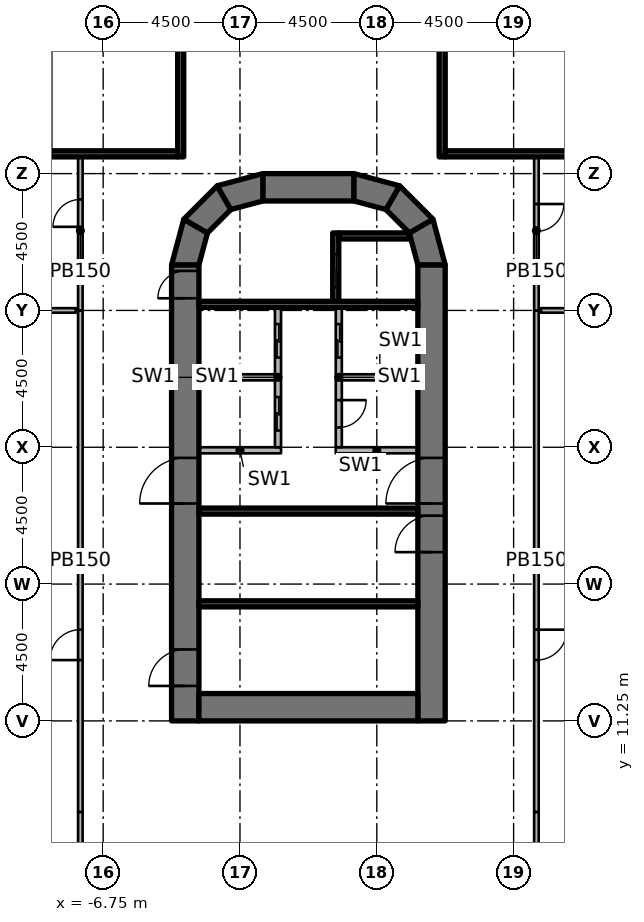
"""IFC4 building model, lengths in metres.
Left out: names, types, materials, properties, quantities, classifications, styles, units other than length and angle.
Written with IfcOpenShell. Run it as: python <this file> out.ifc"""

import sys

from ifc_helpers import new_model, si_unit, direction, frame, frame_2d, origin, origin_2d, place, context, subcontext, project, spatial, polyline, rectangle, outline, extrude, element, fill, save


model = new_model("IFC4")
c1 = context("Model", 3, precision=1e-05, world=origin(), true_north=direction((0.0, 1.0)))
c2 = subcontext(c1, "Body", "Model", "MODEL_VIEW")
j1 = project(units=[si_unit("LENGTHUNIT", "METRE"), si_unit("PLANEANGLEUNIT", "RADIAN")], contexts=[c1])
p1 = place(None, origin())
s1 = spatial("IfcSite", under=j1, at=p1, CompositionType="ELEMENT")
p2 = place(p1, origin())
s2 = spatial("IfcBuilding", under=s1, at=p2, CompositionType="ELEMENT")
p3 = place(p2, frame((0.0, 0.0, 12.0)))
s3 = spatial("IfcBuildingStorey", under=s2, at=p3, CompositionType="ELEMENT", Elevation=12.0)
for number, where, z_axis, x_axis in (
    (1, (-6.25, 10.75, 0.0), (0.0, 0.0, 1.0), (1.0, 0.0, 0.0)),
    (2, (-6.25, 15.75, 0.0), (0.0, 0.0, 1.0), (1.0, 0.0, 0.0)),
    (3, (-6.25, 20.25, 0.0), (0.0, 0.0, 1.0), (1.0, 0.0, 0.0)),
    (4, (-6.25, 24.65, 0.0), (0.0, 0.0, 1.0), (1.0, 0.0, 0.0)),
    (5, (-6.25, 26.7, 0.0), (0.0, 0.0, 1.0), (1.0, 0.0, 0.0)),
    (6, (-2.25, 33.11, 0.0), (0.0, 0.0, 1.0), (1.0, 0.0, 0.0)),
    (7, (2.25, 33.11, 0.0), (0.0, 0.0, 1.0), (1.0, 0.0, 0.0)),
    (8, (6.25, 10.75, 0.0), (0.0, 0.0, 1.0), (1.0, 0.0, 0.0)),
    (9, (6.25, 15.75, 0.0), (0.0, 0.0, 1.0), (1.0, 0.0, 0.0)),
    (10, (6.25, 20.25, 0.0), (0.0, 0.0, 1.0), (1.0, 0.0, 0.0)),
    (11, (6.25, 24.65, 0.0), (0.0, 0.0, 1.0), (1.0, 0.0, 0.0)),
    (12, (6.25, 26.7, 0.0), (0.0, 0.0, 1.0), (1.0, 0.0, 0.0)),
):
    element("IfcColumn", number, at=place(p3, frame(where, z_axis=z_axis, x_axis=x_axis)), inside=s3, PredefinedType="COLUMN", context=c2, shape_type="SweptSolid", body=[
        extrude(rectangle(XDim=1.2, YDim=1.2, at=origin_2d()), origin(), (0.0, 0.0, 1.0), 4.55),
    ])
p4 = place(p3, frame((-4.05, 11.25, 0.0), z_axis=(0.0, 0.0, 1.0), x_axis=(0.0, 1.0, 0.0)))
e13 = element("IfcWall", 13, at=p4, inside=s3, PredefinedType="SHEAR", context=c2, shape_type="SweptSolid", body=[
    extrude(rectangle(XDim=15.0, YDim=0.9, at=frame_2d((7.5, 0.0))), origin(), (0.0, 0.0, 1.0), 5.0),
])
p5 = place(p4, frame((7.15, 0.0, 0.0)))
e14 = element("IfcOpeningElement", 14, at=p5, cuts=e13, PredefinedType="OPENING", context=c2, shape_type="SweptSolid", body=[
    extrude(rectangle(XDim=1.5, YDim=2.3, at=frame_2d((0.75, 1.15))), frame((0.0, 0.46, 0.0), z_axis=(0.0, -1.0, 0.0), x_axis=(1.0, 0.0, 0.0)), (0.0, 0.0, 1.0), 0.92),
])
p6 = place(p4, frame((13.9, 0.0, 0.0)))
e15 = element("IfcOpeningElement", 15, at=p6, cuts=e13, PredefinedType="OPENING", context=c2, shape_type="SweptSolid", body=[
    extrude(rectangle(XDim=0.9, YDim=2.1, at=frame_2d((0.45, 1.05))), frame((0.0, 0.46, 0.0), z_axis=(0.0, -1.0, 0.0), x_axis=(1.0, 0.0, 0.0)), (0.0, 0.0, 1.0), 0.92),
])
p7 = place(p4, frame((1.15, 0.0, 0.0)))
e16 = element("IfcOpeningElement", 16, at=p7, cuts=e13, PredefinedType="OPENING", context=c2, shape_type="SweptSolid", body=[
    extrude(rectangle(XDim=1.2, YDim=2.1, at=frame_2d((0.6, 1.05))), frame((0.0, 0.46, 0.0), z_axis=(0.0, -1.0, 0.0), x_axis=(1.0, 0.0, 0.0)), (0.0, 0.0, 1.0), 0.92),
])
p8 = place(p3, frame((4.05, 11.25, 0.0), z_axis=(0.0, 0.0, 1.0), x_axis=(0.0, 1.0, 0.0)))
e17 = element("IfcWall", 17, at=p8, inside=s3, PredefinedType="SHEAR", context=c2, shape_type="SweptSolid", body=[
    extrude(rectangle(XDim=15.0, YDim=0.9, at=frame_2d((7.5, 0.0))), origin(), (0.0, 0.0, 1.0), 5.0),
])
p9 = place(p8, frame((7.15, 0.0, 0.0)))
e18 = element("IfcOpeningElement", 18, at=p9, cuts=e17, PredefinedType="OPENING", context=c2, shape_type="SweptSolid", body=[
    extrude(rectangle(XDim=1.5, YDim=2.3, at=frame_2d((0.75, 1.15))), frame((0.0, 0.46, 0.0), z_axis=(0.0, -1.0, 0.0), x_axis=(1.0, 0.0, 0.0)), (0.0, 0.0, 1.0), 0.92),
])
p10 = place(p8, frame((5.55, 0.0, 0.0)))
e19 = element("IfcOpeningElement", 19, at=p10, cuts=e17, PredefinedType="OPENING", context=c2, shape_type="SweptSolid", body=[
    extrude(rectangle(XDim=1.2, YDim=2.1, at=frame_2d((0.6, 1.05))), frame((0.0, 0.46, 0.0), z_axis=(0.0, -1.0, 0.0), x_axis=(1.0, 0.0, 0.0)), (0.0, 0.0, 1.0), 0.92),
])
p11 = place(p3, frame((-3.6, 11.7, 0.0), z_axis=(0.0, 0.0, 1.0), x_axis=(1.0, 0.0, 0.0)))
e20 = element("IfcWall", 20, at=p11, inside=s3, PredefinedType="SHEAR", context=c2, shape_type="SweptSolid", body=[
    extrude(rectangle(XDim=7.2, YDim=0.9, at=frame_2d((3.6, 0.0))), origin(), (0.0, 0.0, 1.0), 5.0),
])
p12 = place(p3, frame((-1.5, 28.8, 0.0), z_axis=(0.0, 0.0, 1.0), x_axis=(1.0, 0.0, 0.0)))
e21 = element("IfcWall", 21, at=p12, inside=s3, PredefinedType="SHEAR", context=c2, shape_type="SweptSolid", body=[
    extrude(rectangle(XDim=3.0, YDim=0.9, at=frame_2d((1.5, 0.0))), origin(), (0.0, 0.0, 1.0), 5.0),
])
p13 = place(p3, origin())
e22 = element("IfcWall", 22, at=p13, inside=s3, PredefinedType="SHEAR", context=c2, shape_type="SweptSolid", body=[
    extrude(outline(polyline([(-4.5, 26.25), (-4.098, 27.75), (-3.319, 27.3), (-3.6, 26.25), (-4.5, 26.25)])), origin(), (0.0, 0.0, 1.0), 5.0),
])
p14 = place(p3, origin())
e23 = element("IfcWall", 23, at=p14, inside=s3, PredefinedType="SHEAR", context=c2, shape_type="SweptSolid", body=[
    extrude(outline(polyline([(-4.098, 27.75), (-3.0, 28.848), (-2.55, 28.069), (-3.319, 27.3), (-4.098, 27.75)])), origin(), (0.0, 0.0, 1.0), 5.0),
])
p15 = place(p3, origin())
e24 = element("IfcWall", 24, at=p15, inside=s3, PredefinedType="SHEAR", context=c2, shape_type="SweptSolid", body=[
    extrude(outline(polyline([(-3.0, 28.848), (-1.5, 29.25), (-1.5, 28.35), (-2.55, 28.069), (-3.0, 28.848)])), origin(), (0.0, 0.0, 1.0), 5.0),
])
p16 = place(p3, origin())
e25 = element("IfcWall", 25, at=p16, inside=s3, PredefinedType="SHEAR", context=c2, shape_type="SweptSolid", body=[
    extrude(outline(polyline([(4.5, 26.25), (4.098, 27.75), (3.319, 27.3), (3.6, 26.25), (4.5, 26.25)])), origin(), (0.0, 0.0, 1.0), 5.0),
])
p17 = place(p3, origin())
e26 = element("IfcWall", 26, at=p17, inside=s3, PredefinedType="SHEAR", context=c2, shape_type="SweptSolid", body=[
    extrude(outline(polyline([(4.098, 27.75), (3.0, 28.848), (2.55, 28.069), (3.319, 27.3), (4.098, 27.75)])), origin(), (0.0, 0.0, 1.0), 5.0),
])
p18 = place(p3, origin())
e27 = element("IfcWall", 27, at=p18, inside=s3, PredefinedType="SHEAR", context=c2, shape_type="SweptSolid", body=[
    extrude(outline(polyline([(3.0, 28.848), (1.5, 29.25), (1.5, 28.35), (2.55, 28.069), (3.0, 28.848)])), origin(), (0.0, 0.0, 1.0), 5.0),
])
p19 = place(p3, frame((-3.6, 24.95, 0.0), z_axis=(0.0, 0.0, 1.0), x_axis=(1.0, 0.0, 0.0)))
e28 = element("IfcWall", 28, at=p19, inside=s3, PredefinedType="SHEAR", context=c2, shape_type="SweptSolid", body=[
    extrude(rectangle(XDim=7.2, YDim=0.2, at=frame_2d((3.6, 0.0))), origin(), (0.0, 0.0, 1.0), 4.55),
])
p20 = place(p3, frame((0.9, 27.3, 0.0), z_axis=(0.0, 0.0, 1.0), x_axis=(0.0, -1.0, 0.0)))
e29 = element("IfcWall", 29, at=p20, inside=s3, PredefinedType="SHEAR", context=c2, shape_type="SweptSolid", body=[
    extrude(rectangle(XDim=2.25, YDim=0.2, at=frame_2d((1.125, 0.0))), origin(), (0.0, 0.0, 1.0), 4.55),
])
p21 = place(p20, frame((0.7, 0.0, 0.0)))
e30 = element("IfcOpeningElement", 30, at=p21, cuts=e29, PredefinedType="OPENING", context=c2, shape_type="SweptSolid", body=[
    extrude(rectangle(XDim=1.1, YDim=2.3, at=frame_2d((0.55, 1.15))), frame((0.0, 0.11, 0.0), z_axis=(0.0, -1.0, 0.0), x_axis=(1.0, 0.0, 0.0)), (0.0, 0.0, 1.0), 0.22),
])
p22 = place(p3, origin())
e31 = element("IfcWall", 31, at=p22, inside=s3, PredefinedType="SHEAR", context=c2, shape_type="SweptSolid", body=[
    extrude(outline(polyline([(1.0, 27.1), (3.341, 27.1), (3.291, 27.284), (3.275, 27.3), (1.0, 27.3), (1.0, 27.1)])), origin(), (0.0, 0.0, 1.0), 4.55),
])
for number, where, z_axis, x_axis in (
    (32, (-3.6, 18.15, 0.0), (0.0, 0.0, 1.0), (1.0, 0.0, 0.0)),
    (33, (-3.6, 15.1, 0.0), (0.0, 0.0, 1.0), (1.0, 0.0, 0.0)),
):
    element("IfcWall", number, at=place(p3, frame(where, z_axis=z_axis, x_axis=x_axis)), inside=s3, PredefinedType="SHEAR", context=c2, shape_type="SweptSolid", body=[
        extrude(rectangle(XDim=7.2, YDim=0.2, at=frame_2d((3.6, 0.0))), origin(), (0.0, 0.0, 1.0), 4.55),
    ])
p23 = place(p3, frame((-3.6, 20.15, 0.0), z_axis=(0.0, 0.0, 1.0), x_axis=(1.0, 0.0, 0.0)))
e34 = element("IfcWall", 34, at=p23, inside=s3, PredefinedType="PARTITIONING", context=c2, shape_type="SweptSolid", body=[
    extrude(rectangle(XDim=2.7, YDim=0.2, at=frame_2d((1.35, 0.0))), origin(), (0.0, 0.0, 1.0), 4.55),
])
p24 = place(p3, frame((-1.0, 24.85, 0.0), z_axis=(0.0, 0.0, 1.0), x_axis=(0.0, -1.0, 0.0)))
e35 = element("IfcWall", 35, at=p24, inside=s3, PredefinedType="PARTITIONING", context=c2, shape_type="SweptSolid", body=[
    extrude(rectangle(XDim=4.6, YDim=0.2, at=frame_2d((2.3, 0.0))), origin(), (0.0, 0.0, 1.0), 4.55),
])
p25 = place(p24, frame((0.55, 0.0, 0.0)))
e36 = element("IfcOpeningElement", 36, at=p25, cuts=e35, PredefinedType="OPENING", context=c2, shape_type="SweptSolid", body=[
    extrude(rectangle(XDim=1.1, YDim=2.3, at=frame_2d((0.55, 1.15))), frame((0.0, 0.11, 0.0), z_axis=(0.0, -1.0, 0.0), x_axis=(1.0, 0.0, 0.0)), (0.0, 0.0, 1.0), 0.22),
])
p26 = place(p24, frame((2.95, 0.0, 0.0)))
e37 = element("IfcOpeningElement", 37, at=p26, cuts=e35, PredefinedType="OPENING", context=c2, shape_type="SweptSolid", body=[
    extrude(rectangle(XDim=1.1, YDim=2.3, at=frame_2d((0.55, 1.15))), frame((0.0, 0.11, 0.0), z_axis=(0.0, -1.0, 0.0), x_axis=(1.0, 0.0, 0.0)), (0.0, 0.0, 1.0), 0.22),
])
p27 = place(p3, frame((0.9, 20.15, 0.0), z_axis=(0.0, 0.0, 1.0), x_axis=(1.0, 0.0, 0.0)))
e38 = element("IfcWall", 38, at=p27, inside=s3, PredefinedType="PARTITIONING", context=c2, shape_type="SweptSolid", body=[
    extrude(rectangle(XDim=2.7, YDim=0.2, at=frame_2d((1.35, 0.0))), origin(), (0.0, 0.0, 1.0), 4.55),
])
p28 = place(p3, frame((1.0, 24.85, 0.0), z_axis=(0.0, 0.0, 1.0), x_axis=(0.0, -1.0, 0.0)))
e39 = element("IfcWall", 39, at=p28, inside=s3, PredefinedType="PARTITIONING", context=c2, shape_type="SweptSolid", body=[
    extrude(rectangle(XDim=4.6, YDim=0.2, at=frame_2d((2.3, 0.0))), origin(), (0.0, 0.0, 1.0), 4.55),
])
p29 = place(p28, frame((0.55, 0.0, 0.0)))
e40 = element("IfcOpeningElement", 40, at=p29, cuts=e39, PredefinedType="OPENING", context=c2, shape_type="SweptSolid", body=[
    extrude(rectangle(XDim=1.1, YDim=2.3, at=frame_2d((0.55, 1.15))), frame((0.0, 0.11, 0.0), z_axis=(0.0, -1.0, 0.0), x_axis=(1.0, 0.0, 0.0)), (0.0, 0.0, 1.0), 0.22),
])
p30 = place(p28, frame((3.05, 0.0, 0.0)))
e41 = element("IfcOpeningElement", 41, at=p30, cuts=e39, PredefinedType="OPENING", context=c2, shape_type="SweptSolid", body=[
    extrude(rectangle(XDim=0.9, YDim=2.1, at=frame_2d((0.45, 1.05))), frame((0.0, 0.11, 0.0), z_axis=(0.0, -1.0, 0.0), x_axis=(1.0, 0.0, 0.0)), (0.0, 0.0, 1.0), 0.22),
])
for number, where, z_axis, x_axis in (
    (42, (-3.6, 22.55, 0.0), (0.0, 0.0, 1.0), (1.0, 0.0, 0.0)),
    (43, (1.1, 22.55, 0.0), (0.0, 0.0, 1.0), (1.0, 0.0, 0.0)),
):
    element("IfcWall", number, at=place(p3, frame(where, z_axis=z_axis, x_axis=x_axis)), inside=s3, PredefinedType="PARTITIONING", context=c2, shape_type="SweptSolid", body=[
        extrude(rectangle(XDim=2.5, YDim=0.2, at=frame_2d((1.25, 0.0))), origin(), (0.0, 0.0, 1.0), 4.55),
    ])
p31 = place(p3, frame((-4.2, 29.8, 0.0), z_axis=(0.0, 0.0, 1.0), x_axis=(0.0, 1.0, 0.0)))
e44 = element("IfcWall", 44, at=p31, inside=s3, PredefinedType="SHEAR", context=c2, shape_type="SweptSolid", body=[
    extrude(rectangle(XDim=8.0, YDim=0.2, at=frame_2d((4.0, 0.0))), origin(), (0.0, 0.0, 1.0), 4.55),
])
p32 = place(p31, frame((6.3, 0.0, 0.0)))
e45 = element("IfcOpeningElement", 45, at=p32, cuts=e44, PredefinedType="OPENING", context=c2, shape_type="SweptSolid", body=[
    extrude(rectangle(XDim=1.2, YDim=2.1, at=frame_2d((0.6, 1.05))), frame((0.0, 0.11, 0.0), z_axis=(0.0, -1.0, 0.0), x_axis=(1.0, 0.0, 0.0)), (0.0, 0.0, 1.0), 0.22),
])
p33 = place(p3, frame((-8.5, 29.9, 0.0), z_axis=(0.0, 0.0, 1.0), x_axis=(1.0, 0.0, 0.0)))
e46 = element("IfcWall", 46, at=p33, inside=s3, PredefinedType="SHEAR", context=c2, shape_type="SweptSolid", body=[
    extrude(rectangle(XDim=4.2, YDim=0.2, at=frame_2d((2.1, 0.0))), origin(), (0.0, 0.0, 1.0), 4.55),
])
p34 = place(p3, frame((4.4, 29.8, 0.0), z_axis=(0.0, 0.0, 1.0), x_axis=(0.0, 1.0, 0.0)))
e47 = element("IfcWall", 47, at=p34, inside=s3, PredefinedType="SHEAR", context=c2, shape_type="SweptSolid", body=[
    extrude(rectangle(XDim=8.0, YDim=0.2, at=frame_2d((4.0, 0.0))), origin(), (0.0, 0.0, 1.0), 4.55),
])
p35 = place(p34, frame((6.3, 0.0, 0.0)))
e48 = element("IfcOpeningElement", 48, at=p35, cuts=e47, PredefinedType="OPENING", context=c2, shape_type="SweptSolid", body=[
    extrude(rectangle(XDim=1.2, YDim=2.1, at=frame_2d((0.6, 1.05))), frame((0.0, 0.11, 0.0), z_axis=(0.0, -1.0, 0.0), x_axis=(1.0, 0.0, 0.0)), (0.0, 0.0, 1.0), 0.22),
])
p36 = place(p3, frame((4.5, 29.9, 0.0), z_axis=(0.0, 0.0, 1.0), x_axis=(1.0, 0.0, 0.0)))
e49 = element("IfcWall", 49, at=p36, inside=s3, PredefinedType="SHEAR", context=c2, shape_type="SweptSolid", body=[
    extrude(rectangle(XDim=4.2, YDim=0.2, at=frame_2d((2.1, 0.0))), origin(), (0.0, 0.0, 1.0), 4.55),
])
p37 = place(p3, frame((7.5, 24.75, 0.0), z_axis=(0.0, 0.0, 1.0), x_axis=(0.0, -1.0, 0.0)))
e50 = element("IfcWall", 50, at=p37, inside=s3, PredefinedType="PARTITIONING", context=c2, shape_type="SweptSolid", body=[
    extrude(rectangle(XDim=16.5, YDim=0.15, at=frame_2d((8.25, 0.0))), origin(), (0.0, 0.0, 1.0), 4.55),
])
p38 = place(p37, frame((10.5, 0.0, 0.0)))
e51 = element("IfcOpeningElement", 51, at=p38, cuts=e50, PredefinedType="OPENING", context=c2, shape_type="SweptSolid", body=[
    extrude(rectangle(XDim=1.0, YDim=2.1, at=frame_2d((0.5, 1.05))), frame((0.0, 0.085, 0.0), z_axis=(0.0, -1.0, 0.0), x_axis=(1.0, 0.0, 0.0)), (0.0, 0.0, 1.0), 0.17),
])
p39 = place(p3, frame((7.5, 30.0, 0.0), z_axis=(0.0, 0.0, 1.0), x_axis=(0.0, -1.0, 0.0)))
e52 = element("IfcWall", 52, at=p39, inside=s3, PredefinedType="PARTITIONING", context=c2, shape_type="SweptSolid", body=[
    extrude(rectangle(XDim=5.25, YDim=0.15, at=frame_2d((2.625, 0.0))), origin(), (0.0, 0.0, 1.0), 4.55),
])
p40 = place(p39, frame((1.75, 0.0, 0.0)))
e53 = element("IfcOpeningElement", 53, at=p40, cuts=e52, PredefinedType="OPENING", context=c2, shape_type="SweptSolid", body=[
    extrude(rectangle(XDim=0.9, YDim=2.1, at=frame_2d((0.45, 1.05))), frame((0.0, 0.085, 0.0), z_axis=(0.0, -1.0, 0.0), x_axis=(1.0, 0.0, 0.0)), (0.0, 0.0, 1.0), 0.17),
])
p41 = place(p3, frame((-7.5, 8.25, 0.0), z_axis=(0.0, 0.0, 1.0), x_axis=(0.0, 1.0, 0.0)))
e54 = element("IfcWall", 54, at=p41, inside=s3, PredefinedType="PARTITIONING", context=c2, shape_type="SweptSolid", body=[
    extrude(rectangle(XDim=16.5, YDim=0.15, at=frame_2d((8.25, 0.0))), origin(), (0.0, 0.0, 1.0), 4.55),
])
p42 = place(p41, frame((5.0, 0.0, 0.0)))
e55 = element("IfcOpeningElement", 55, at=p42, cuts=e54, PredefinedType="OPENING", context=c2, shape_type="SweptSolid", body=[
    extrude(rectangle(XDim=1.0, YDim=2.1, at=frame_2d((0.5, 1.05))), frame((0.0, 0.085, 0.0), z_axis=(0.0, -1.0, 0.0), x_axis=(1.0, 0.0, 0.0)), (0.0, 0.0, 1.0), 0.17),
])
p43 = place(p3, frame((-7.5, 24.75, 0.0), z_axis=(0.0, 0.0, 1.0), x_axis=(0.0, 1.0, 0.0)))
e56 = element("IfcWall", 56, at=p43, inside=s3, PredefinedType="PARTITIONING", context=c2, shape_type="SweptSolid", body=[
    extrude(rectangle(XDim=5.25, YDim=0.15, at=frame_2d((2.625, 0.0))), origin(), (0.0, 0.0, 1.0), 4.55),
])
p44 = place(p43, frame((2.75, 0.0, 0.0)))
e57 = element("IfcOpeningElement", 57, at=p44, cuts=e56, PredefinedType="OPENING", context=c2, shape_type="SweptSolid", body=[
    extrude(rectangle(XDim=0.9, YDim=2.1, at=frame_2d((0.45, 1.05))), frame((0.0, 0.085, 0.0), z_axis=(0.0, -1.0, 0.0), x_axis=(1.0, 0.0, 0.0)), (0.0, 0.0, 1.0), 0.17),
])
p45 = place(p3, frame((7.65, 24.75, 0.0), z_axis=(0.0, 0.0, 1.0), x_axis=(1.0, 0.0, 0.0)))
e58 = element("IfcWall", 58, at=p45, inside=s3, PredefinedType="PARTITIONING", context=c2, shape_type="SweptSolid", body=[
    extrude(rectangle(XDim=11.4, YDim=0.15, at=frame_2d((5.7, 0.0))), origin(), (0.0, 0.0, 1.0), 4.55),
])
p46 = place(p3, frame((7.5, 1.65, 0.0), z_axis=(0.0, 0.0, 1.0), x_axis=(0.0, 1.0, 0.0)))
e59 = element("IfcWall", 59, at=p46, inside=s3, PredefinedType="PARTITIONING", context=c2, shape_type="SweptSolid", body=[
    extrude(rectangle(XDim=6.6, YDim=0.15, at=frame_2d((3.3, 0.0))), origin(), (0.0, 0.0, 1.0), 4.55),
])
p47 = place(p3, frame((-19.05, 24.75, 0.0), z_axis=(0.0, 0.0, 1.0), x_axis=(1.0, 0.0, 0.0)))
e60 = element("IfcWall", 60, at=p47, inside=s3, PredefinedType="PARTITIONING", context=c2, shape_type="SweptSolid", body=[
    extrude(rectangle(XDim=11.4, YDim=0.15, at=frame_2d((5.7, 0.0))), origin(), (0.0, 0.0, 1.0), 4.55),
])
p48 = place(p3, frame((-7.5, 8.25, 0.0), z_axis=(0.0, 0.0, 1.0), x_axis=(0.0, -1.0, 0.0)))
e61 = element("IfcWall", 61, at=p48, inside=s3, PredefinedType="PARTITIONING", context=c2, shape_type="SweptSolid", body=[
    extrude(rectangle(XDim=6.6, YDim=0.15, at=frame_2d((3.3, 0.0))), origin(), (0.0, 0.0, 1.0), 4.55),
])
p49 = place(p5, origin())
e62 = element("IfcDoor", 62, at=p49, inside=s3, OperationType="DOUBLE_DOOR_SINGLE_SWING", PredefinedType="DOOR", context=c2, shape_type="SweptSolid", body=[
    extrude(rectangle(XDim=1.5, YDim=2.3, at=frame_2d((0.75, 1.15))), frame((0.0, 0.025, 0.0), z_axis=(0.0, -1.0, 0.0), x_axis=(1.0, 0.0, 0.0)), (0.0, 0.0, 1.0), 0.05),
])
fill(e14, e62)
p50 = place(p9, origin())
e63 = element("IfcDoor", 63, at=p50, inside=s3, OperationType="DOUBLE_DOOR_SINGLE_SWING", PredefinedType="DOOR", context=c2, shape_type="SweptSolid", body=[
    extrude(rectangle(XDim=1.5, YDim=2.3, at=frame_2d((0.75, 1.15))), frame((0.0, 0.025, 0.0), z_axis=(0.0, -1.0, 0.0), x_axis=(1.0, 0.0, 0.0)), (0.0, 0.0, 1.0), 0.05),
])
fill(e18, e63)
p51 = place(p6, origin())
e64 = element("IfcDoor", 64, at=p51, inside=s3, OperationType="SINGLE_SWING_RIGHT", PredefinedType="DOOR", context=c2, shape_type="SweptSolid", body=[
    extrude(rectangle(XDim=0.9, YDim=2.1, at=frame_2d((0.45, 1.05))), frame((0.0, 0.025, 0.0), z_axis=(0.0, -1.0, 0.0), x_axis=(1.0, 0.0, 0.0)), (0.0, 0.0, 1.0), 0.05),
])
fill(e15, e64)
p52 = place(p10, origin())
e65 = element("IfcDoor", 65, at=p52, inside=s3, OperationType="SINGLE_SWING_RIGHT", PredefinedType="DOOR", context=c2, shape_type="SweptSolid", body=[
    extrude(rectangle(XDim=1.2, YDim=2.1, at=frame_2d((0.6, 1.05))), frame((0.0, 0.025, 0.0), z_axis=(0.0, -1.0, 0.0), x_axis=(1.0, 0.0, 0.0)), (0.0, 0.0, 1.0), 0.05),
])
fill(e19, e65)
p53 = place(p7, origin())
e66 = element("IfcDoor", 66, at=p53, inside=s3, OperationType="SINGLE_SWING_RIGHT", PredefinedType="DOOR", context=c2, shape_type="SweptSolid", body=[
    extrude(rectangle(XDim=1.2, YDim=2.1, at=frame_2d((0.6, 1.05))), frame((0.0, 0.025, 0.0), z_axis=(0.0, -1.0, 0.0), x_axis=(1.0, 0.0, 0.0)), (0.0, 0.0, 1.0), 0.05),
])
fill(e16, e66)
p54 = place(p21, origin())
e67 = element("IfcDoor", 67, at=p54, inside=s3, OperationType="DOUBLE_DOOR_SLIDING", PredefinedType="DOOR", context=c2, shape_type="SweptSolid", body=[
    extrude(rectangle(XDim=1.1, YDim=2.3, at=frame_2d((0.55, 1.15))), frame((0.0, 0.025, 0.0), z_axis=(0.0, -1.0, 0.0), x_axis=(1.0, 0.0, 0.0)), (0.0, 0.0, 1.0), 0.05),
])
fill(e30, e67)
p55 = place(p25, origin())
e68 = element("IfcDoor", 68, at=p55, inside=s3, OperationType="DOUBLE_DOOR_SLIDING", PredefinedType="DOOR", context=c2, shape_type="SweptSolid", body=[
    extrude(rectangle(XDim=1.1, YDim=2.3, at=frame_2d((0.55, 1.15))), frame((0.0, 0.025, 0.0), z_axis=(0.0, -1.0, 0.0), x_axis=(1.0, 0.0, 0.0)), (0.0, 0.0, 1.0), 0.05),
])
fill(e36, e68)
p56 = place(p26, origin())
e69 = element("IfcDoor", 69, at=p56, inside=s3, OperationType="DOUBLE_DOOR_SLIDING", PredefinedType="DOOR", context=c2, shape_type="SweptSolid", body=[
    extrude(rectangle(XDim=1.1, YDim=2.3, at=frame_2d((0.55, 1.15))), frame((0.0, 0.025, 0.0), z_axis=(0.0, -1.0, 0.0), x_axis=(1.0, 0.0, 0.0)), (0.0, 0.0, 1.0), 0.05),
])
fill(e37, e69)
p57 = place(p29, origin())
e70 = element("IfcDoor", 70, at=p57, inside=s3, OperationType="DOUBLE_DOOR_SLIDING", PredefinedType="DOOR", context=c2, shape_type="SweptSolid", body=[
    extrude(rectangle(XDim=1.1, YDim=2.3, at=frame_2d((0.55, 1.15))), frame((0.0, 0.025, 0.0), z_axis=(0.0, -1.0, 0.0), x_axis=(1.0, 0.0, 0.0)), (0.0, 0.0, 1.0), 0.05),
])
fill(e40, e70)
p58 = place(p30, origin())
e71 = element("IfcDoor", 71, at=p58, inside=s3, OperationType="SINGLE_SWING_RIGHT", PredefinedType="DOOR", context=c2, shape_type="SweptSolid", body=[
    extrude(rectangle(XDim=0.9, YDim=2.1, at=frame_2d((0.45, 1.05))), frame((0.0, 0.025, 0.0), z_axis=(0.0, -1.0, 0.0), x_axis=(1.0, 0.0, 0.0)), (0.0, 0.0, 1.0), 0.05),
])
fill(e41, e71)
p59 = place(p38, origin())
e72 = element("IfcDoor", 72, at=p59, inside=s3, OperationType="SINGLE_SWING_LEFT", PredefinedType="DOOR", context=c2, shape_type="SweptSolid", body=[
    extrude(rectangle(XDim=1.0, YDim=2.1, at=frame_2d((0.5, 1.05))), frame((0.0, 0.025, 0.0), z_axis=(0.0, -1.0, 0.0), x_axis=(1.0, 0.0, 0.0)), (0.0, 0.0, 1.0), 0.05),
])
fill(e51, e72)
p60 = place(p40, origin())
e73 = element("IfcDoor", 73, at=p60, inside=s3, OperationType="SINGLE_SWING_LEFT", PredefinedType="DOOR", context=c2, shape_type="SweptSolid", body=[
    extrude(rectangle(XDim=0.9, YDim=2.1, at=frame_2d((0.45, 1.05))), frame((0.0, 0.025, 0.0), z_axis=(0.0, -1.0, 0.0), x_axis=(1.0, 0.0, 0.0)), (0.0, 0.0, 1.0), 0.05),
])
fill(e53, e73)
p61 = place(p42, origin())
e74 = element("IfcDoor", 74, at=p61, inside=s3, OperationType="SINGLE_SWING_LEFT", PredefinedType="DOOR", context=c2, shape_type="SweptSolid", body=[
    extrude(rectangle(XDim=1.0, YDim=2.1, at=frame_2d((0.5, 1.05))), frame((0.0, 0.025, 0.0), z_axis=(0.0, -1.0, 0.0), x_axis=(1.0, 0.0, 0.0)), (0.0, 0.0, 1.0), 0.05),
])
fill(e55, e74)
p62 = place(p44, origin())
e75 = element("IfcDoor", 75, at=p62, inside=s3, OperationType="SINGLE_SWING_LEFT", PredefinedType="DOOR", context=c2, shape_type="SweptSolid", body=[
    extrude(rectangle(XDim=0.9, YDim=2.1, at=frame_2d((0.45, 1.05))), frame((0.0, 0.025, 0.0), z_axis=(0.0, -1.0, 0.0), x_axis=(1.0, 0.0, 0.0)), (0.0, 0.0, 1.0), 0.05),
])
fill(e57, e75)
save(model, sys.argv[1])
